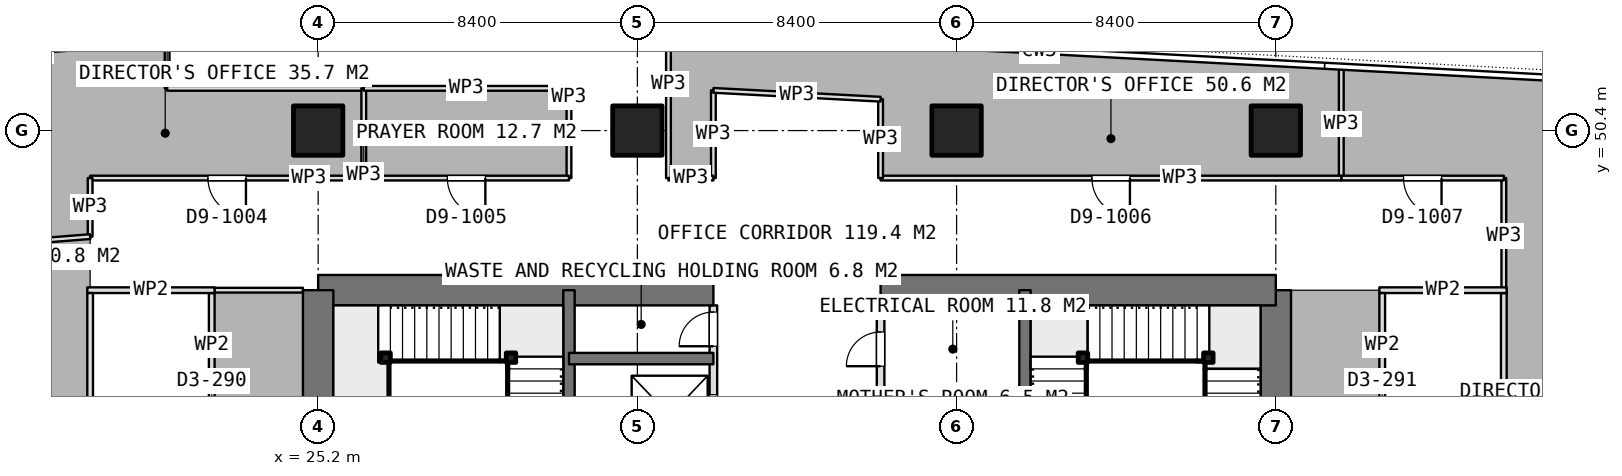
"""IFC4 building model, lengths in metres.
Left out: names, types, materials, properties, quantities, classifications, styles, units other than length and angle.
Written with IfcOpenShell. Run it as: python <this file> out.ifc"""

import sys

from ifc_helpers import new_model, si_unit, direction, frame, frame_2d, origin, origin_2d, place, context, subcontext, project, spatial, rectangle, extrude, element, fill, save


model = new_model("IFC4")
c1 = context("Model", 3, precision=1e-05, world=origin(), true_north=direction((0.0, 1.0)))
c2 = subcontext(c1, "Body", "Model", "MODEL_VIEW")
j1 = project(units=[si_unit("LENGTHUNIT", "METRE"), si_unit("PLANEANGLEUNIT", "RADIAN")], contexts=[c1])
p1 = place(None, origin())
s1 = spatial("IfcSite", under=j1, at=p1, CompositionType="ELEMENT")
p2 = place(p1, origin())
s2 = spatial("IfcBuilding", under=s1, at=p2, CompositionType="ELEMENT")
p3 = place(p2, frame((0.0, 0.0, 268.85)))
s3 = spatial("IfcBuildingStorey", under=s2, at=p3, CompositionType="ELEMENT", Elevation=268.85)
p4 = place(p3, frame((25.2, 46.2, 0.0), z_axis=(0.0, 0.0, 1.0), x_axis=(1.0, 0.0, 0.0)))
e1 = element("IfcWall", 1, at=p4, inside=s3, PredefinedType="SHEAR", context=c2, shape_type="SweptSolid", body=[
    extrude(rectangle(XDim=10.4, YDim=0.8, at=frame_2d((5.2, 0.0))), origin(), (0.0, 0.0, 1.0), 3.75),
])
p5 = place(p3, frame((40.0, 46.2, 0.0), z_axis=(0.0, 0.0, 1.0), x_axis=(1.0, 0.0, 0.0)))
e2 = element("IfcWall", 2, at=p5, inside=s3, PredefinedType="SHEAR", context=c2, shape_type="SweptSolid", body=[
    extrude(rectangle(XDim=10.4, YDim=0.8, at=frame_2d((5.2, 0.0))), origin(), (0.0, 0.0, 1.0), 3.75),
])
p6 = place(p3, frame((25.2, 21.0, 0.0), z_axis=(0.0, 0.0, 1.0), x_axis=(0.0, 1.0, 0.0)))
e3 = element("IfcWall", 3, at=p6, inside=s3, PredefinedType="SHEAR", context=c2, shape_type="SweptSolid", body=[
    extrude(rectangle(XDim=25.2, YDim=0.8, at=frame_2d((12.6, 0.0))), origin(), (0.0, 0.0, 1.0), 3.75),
])
p7 = place(p6, frame((7.8, 0.0, 0.0)))
e4 = element("IfcOpeningElement", 4, at=p7, cuts=e3, PredefinedType="OPENING", context=c2, shape_type="SweptSolid", body=[
    extrude(rectangle(XDim=1.2, YDim=2.1, at=frame_2d((0.6, 1.05))), frame((0.0, 0.41, 0.0), z_axis=(0.0, -1.0, 0.0), x_axis=(1.0, 0.0, 0.0)), (0.0, 0.0, 1.0), 0.82),
])
p8 = place(p6, frame((14.25, 0.0, 0.0)))
e5 = element("IfcOpeningElement", 5, at=p8, cuts=e3, PredefinedType="OPENING", context=c2, shape_type="SweptSolid", body=[
    extrude(rectangle(XDim=0.9, YDim=2.1, at=frame_2d((0.45, 1.05))), frame((0.0, 0.41, 0.0), z_axis=(0.0, -1.0, 0.0), x_axis=(1.0, 0.0, 0.0)), (0.0, 0.0, 1.0), 0.82),
])
p9 = place(p6, frame((16.85, 0.0, 0.0)))
e6 = element("IfcOpeningElement", 6, at=p9, cuts=e3, PredefinedType="OPENING", context=c2, shape_type="SweptSolid", body=[
    extrude(rectangle(XDim=0.9, YDim=2.1, at=frame_2d((0.45, 1.05))), frame((0.0, 0.41, 0.0), z_axis=(0.0, -1.0, 0.0), x_axis=(1.0, 0.0, 0.0)), (0.0, 0.0, 1.0), 0.82),
])
p10 = place(p6, frame((18.95, 0.0, 0.0)))
e7 = element("IfcOpeningElement", 7, at=p10, cuts=e3, PredefinedType="OPENING", context=c2, shape_type="SweptSolid", body=[
    extrude(rectangle(XDim=1.2, YDim=2.1, at=frame_2d((0.6, 1.05))), frame((0.0, 0.41, 0.0), z_axis=(0.0, -1.0, 0.0), x_axis=(1.0, 0.0, 0.0)), (0.0, 0.0, 1.0), 0.82),
])
p11 = place(p3, frame((50.4, 21.0, 0.0), z_axis=(0.0, 0.0, 1.0), x_axis=(0.0, 1.0, 0.0)))
e8 = element("IfcWall", 8, at=p11, inside=s3, PredefinedType="SHEAR", context=c2, shape_type="SweptSolid", body=[
    extrude(rectangle(XDim=25.2, YDim=0.8, at=frame_2d((12.6, 0.0))), origin(), (0.0, 0.0, 1.0), 3.75),
])
p12 = place(p11, frame((16.2, 0.0, 0.0)))
e9 = element("IfcOpeningElement", 9, at=p12, cuts=e8, PredefinedType="OPENING", context=c2, shape_type="SweptSolid", body=[
    extrude(rectangle(XDim=1.2, YDim=2.1, at=frame_2d((0.6, 1.05))), frame((0.0, 0.41, 0.0), z_axis=(0.0, -1.0, 0.0), x_axis=(1.0, 0.0, 0.0)), (0.0, 0.0, 1.0), 0.82),
])
p13 = place(p11, frame((10.05, 0.0, 0.0)))
e10 = element("IfcOpeningElement", 10, at=p13, cuts=e8, PredefinedType="OPENING", context=c2, shape_type="SweptSolid", body=[
    extrude(rectangle(XDim=0.9, YDim=2.1, at=frame_2d((0.45, 1.05))), frame((0.0, 0.41, 0.0), z_axis=(0.0, -1.0, 0.0), x_axis=(1.0, 0.0, 0.0)), (0.0, 0.0, 1.0), 0.82),
])
p14 = place(p11, frame((7.45, 0.0, 0.0)))
e11 = element("IfcOpeningElement", 11, at=p14, cuts=e8, PredefinedType="OPENING", context=c2, shape_type="SweptSolid", body=[
    extrude(rectangle(XDim=0.9, YDim=2.1, at=frame_2d((0.45, 1.05))), frame((0.0, 0.41, 0.0), z_axis=(0.0, -1.0, 0.0), x_axis=(1.0, 0.0, 0.0)), (0.0, 0.0, 1.0), 0.82),
])
p15 = place(p11, frame((0.6, 0.0, 0.0)))
e12 = element("IfcOpeningElement", 12, at=p15, cuts=e8, PredefinedType="OPENING", context=c2, shape_type="SweptSolid", body=[
    extrude(rectangle(XDim=1.2, YDim=2.1, at=frame_2d((0.6, 1.05))), frame((0.0, 0.41, 0.0), z_axis=(0.0, -1.0, 0.0), x_axis=(1.0, 0.0, 0.0)), (0.0, 0.0, 1.0), 0.82),
])
for number, where, z_axis, x_axis in (
    (13, (31.8, 21.0, 0.0), (0.0, 0.0, 1.0), (0.0, 1.0, 0.0)),
    (14, (43.8, 21.0, 0.0), (0.0, 0.0, 1.0), (0.0, 1.0, 0.0)),
):
    element("IfcWall", number, at=place(p3, frame(where, z_axis=z_axis, x_axis=x_axis)), inside=s3, PredefinedType="SHEAR", context=c2, shape_type="SweptSolid", body=[
        extrude(rectangle(XDim=25.2, YDim=0.3, at=frame_2d((12.6, 0.0))), origin(), (0.0, 0.0, 1.0), 3.75),
    ])
p16 = place(p3, frame((31.8, 44.4, 0.0), z_axis=(0.0, 0.0, 1.0), x_axis=(1.0, 0.0, 0.0)))
e15 = element("IfcWall", 15, at=p16, inside=s3, PredefinedType="SHEAR", context=c2, shape_type="SweptSolid", body=[
    extrude(rectangle(XDim=3.8, YDim=0.3, at=frame_2d((1.9, 0.0))), origin(), (0.0, 0.0, 1.0), 3.75),
])
for number, where, z_axis, x_axis in (
    (16, (25.2, 50.4, 0.0), (0.0, 0.0, 1.0), (1.0, 0.0, 0.0)),
    (17, (33.6, 50.4, 0.0), (0.0, 0.0, 1.0), (1.0, 0.0, 0.0)),
    (18, (42.0, 50.4, 0.0), (0.0, 0.0, 1.0), (1.0, 0.0, 0.0)),
    (19, (50.4, 50.4, 0.0), (0.0, 0.0, 1.0), (1.0, 0.0, 0.0)),
):
    element("IfcColumn", number, at=place(p3, frame(where, z_axis=z_axis, x_axis=x_axis)), inside=s3, PredefinedType="COLUMN", context=c2, shape_type="SweptSolid", body=[
        extrude(rectangle(XDim=1.3, YDim=1.3, at=origin_2d()), origin(), (0.0, 0.0, 1.0), 3.75),
    ])
p17 = place(p3, frame((40.0, 41.55, 0.0), z_axis=(0.0, 0.0, 1.0), x_axis=(0.0, 1.0, 0.0)))
e20 = element("IfcWall", 20, at=p17, inside=s3, PredefinedType="PARTITIONING", context=c2, shape_type="SweptSolid", body=[
    extrude(rectangle(XDim=4.25, YDim=0.2, at=frame_2d((2.125, 0.0))), origin(), (0.0, 0.0, 1.0), 3.5),
])
p18 = place(p17, frame((2.65, 0.0, 0.0)))
e21 = element("IfcOpeningElement", 21, at=p18, cuts=e20, PredefinedType="OPENING", context=c2, shape_type="SweptSolid", body=[
    extrude(rectangle(XDim=0.9, YDim=2.1, at=frame_2d((0.45, 1.05))), frame((0.0, 0.11, 0.0), z_axis=(0.0, -1.0, 0.0), x_axis=(1.0, 0.0, 0.0)), (0.0, 0.0, 1.0), 0.22),
])
p19 = place(p17, frame((0.25, 0.0, 0.0)))
e22 = element("IfcOpeningElement", 22, at=p19, cuts=e20, PredefinedType="OPENING", context=c2, shape_type="SweptSolid", body=[
    extrude(rectangle(XDim=0.9, YDim=2.1, at=frame_2d((0.45, 1.05))), frame((0.0, 0.11, 0.0), z_axis=(0.0, -1.0, 0.0), x_axis=(1.0, 0.0, 0.0)), (0.0, 0.0, 1.0), 0.22),
])
p20 = place(p3, frame((35.6, 41.55, 0.0), z_axis=(0.0, 0.0, 1.0), x_axis=(0.0, 1.0, 0.0)))
e23 = element("IfcWall", 23, at=p20, inside=s3, PredefinedType="PARTITIONING", context=c2, shape_type="SweptSolid", body=[
    extrude(rectangle(XDim=4.25, YDim=0.2, at=frame_2d((2.125, 0.0))), origin(), (0.0, 0.0, 1.0), 3.5),
])
p21 = place(p20, frame((3.175, 0.0, 0.0)))
e24 = element("IfcOpeningElement", 24, at=p21, cuts=e23, PredefinedType="OPENING", context=c2, shape_type="SweptSolid", body=[
    extrude(rectangle(XDim=0.9, YDim=2.1, at=frame_2d((0.45, 1.05))), frame((0.0, 0.11, 0.0), z_axis=(0.0, -1.0, 0.0), x_axis=(1.0, 0.0, 0.0)), (0.0, 0.0, 1.0), 0.22),
])
p22 = place(p20, frame((0.8, 0.0, 0.0)))
e25 = element("IfcOpeningElement", 25, at=p22, cuts=e23, PredefinedType="OPENING", context=c2, shape_type="SweptSolid", body=[
    extrude(rectangle(XDim=1.1, YDim=2.1, at=frame_2d((0.55, 1.05))), frame((0.0, 0.11, 0.0), z_axis=(0.0, -1.0, 0.0), x_axis=(1.0, 0.0, 0.0)), (0.0, 0.0, 1.0), 0.22),
])
p23 = place(p3, frame((53.125, 46.2, 0.0), z_axis=(0.0, 0.0, 1.0), x_axis=(1.0, 0.0, 0.0)))
e26 = element("IfcWall", 26, at=p23, inside=s3, PredefinedType="PARTITIONING", context=c2, shape_type="SweptSolid", body=[
    extrude(rectangle(XDim=3.35, YDim=0.15, at=frame_2d((1.675, 0.0))), origin(), (0.0, 0.0, 1.0), 3.5),
])
p24 = place(p3, frame((53.2, 39.275, 0.0), z_axis=(0.0, 0.0, 1.0), x_axis=(0.0, 1.0, 0.0)))
e27 = element("IfcWall", 27, at=p24, inside=s3, PredefinedType="PARTITIONING", context=c2, shape_type="SweptSolid", body=[
    extrude(rectangle(XDim=6.85, YDim=0.15, at=frame_2d((3.425, 0.0))), origin(), (0.0, 0.0, 1.0), 3.5),
])
p25 = place(p24, frame((2.925, 0.0, 0.0)))
e28 = element("IfcOpeningElement", 28, at=p25, cuts=e27, PredefinedType="OPENING", context=c2, shape_type="SweptSolid", body=[
    extrude(rectangle(XDim=1.0, YDim=2.1, at=frame_2d((0.5, 1.05))), frame((0.0, 0.085, 0.0), z_axis=(0.0, -1.0, 0.0), x_axis=(1.0, 0.0, 0.0)), (0.0, 0.0, 1.0), 0.17),
])
p26 = place(p3, frame((56.4, 39.275, 0.0), z_axis=(0.0, 0.0, 1.0), x_axis=(0.0, 1.0, 0.0)))
e29 = element("IfcWall", 29, at=p26, inside=s3, PredefinedType="PARTITIONING", context=c2, shape_type="SweptSolid", body=[
    extrude(rectangle(XDim=6.85, YDim=0.15, at=frame_2d((3.425, 0.0))), origin(), (0.0, 0.0, 1.0), 3.5),
])
p27 = place(p3, frame((19.125, 46.2, 0.0), z_axis=(0.0, 0.0, 1.0), x_axis=(1.0, 0.0, 0.0)))
e30 = element("IfcWall", 30, at=p27, inside=s3, PredefinedType="PARTITIONING", context=c2, shape_type="SweptSolid", body=[
    extrude(rectangle(XDim=3.35, YDim=0.15, at=frame_2d((1.675, 0.0))), origin(), (0.0, 0.0, 1.0), 3.5),
])
p28 = place(p3, frame((19.2, 39.275, 0.0), z_axis=(0.0, 0.0, 1.0), x_axis=(0.0, 1.0, 0.0)))
e31 = element("IfcWall", 31, at=p28, inside=s3, PredefinedType="PARTITIONING", context=c2, shape_type="SweptSolid", body=[
    extrude(rectangle(XDim=6.85, YDim=0.15, at=frame_2d((3.425, 0.0))), origin(), (0.0, 0.0, 1.0), 3.5),
])
p29 = place(p3, frame((22.4, 39.275, 0.0), z_axis=(0.0, 0.0, 1.0), x_axis=(0.0, 1.0, 0.0)))
e32 = element("IfcWall", 32, at=p29, inside=s3, PredefinedType="PARTITIONING", context=c2, shape_type="SweptSolid", body=[
    extrude(rectangle(XDim=6.85, YDim=0.15, at=frame_2d((3.425, 0.0))), origin(), (0.0, 0.0, 1.0), 3.5),
])
p30 = place(p29, frame((2.925, 0.0, 0.0)))
e33 = element("IfcOpeningElement", 33, at=p30, cuts=e32, PredefinedType="OPENING", context=c2, shape_type="SweptSolid", body=[
    extrude(rectangle(XDim=1.0, YDim=2.1, at=frame_2d((0.5, 1.05))), frame((0.0, 0.085, 0.0), z_axis=(0.0, -1.0, 0.0), x_axis=(1.0, 0.0, 0.0)), (0.0, 0.0, 1.0), 0.17),
])
p31 = place(p3, frame((52.123, 49.15, 0.0), z_axis=(0.0, 0.0, 1.0), x_axis=(0.0, 1.0, 0.0)))
e34 = element("IfcWall", 34, at=p31, inside=s3, PredefinedType="PARTITIONING", context=c2, shape_type="SweptSolid", body=[
    extrude(rectangle(XDim=2.852, YDim=0.125, at=frame_2d((1.426, 0.0))), origin(), (0.0, 0.0, 1.0), 3.5),
])
p32 = place(p3, frame((56.4, 46.125, 0.0), z_axis=(0.0, 0.0, 1.0), x_axis=(0.0, 1.0, 0.0)))
e35 = element("IfcWall", 35, at=p32, inside=s3, PredefinedType="PARTITIONING", context=c2, shape_type="SweptSolid", body=[
    extrude(rectangle(XDim=3.025, YDim=0.125, at=frame_2d((1.512, 0.0))), origin(), (0.0, 0.0, 1.0), 3.5),
])
p33 = place(p3, frame((56.4, 49.15, 0.0), z_axis=(0.0, 0.0, 1.0), x_axis=(-1.0, 0.0, 0.0)))
e36 = element("IfcWall", 36, at=p33, inside=s3, PredefinedType="PARTITIONING", context=c2, shape_type="SweptSolid", body=[
    extrude(rectangle(XDim=4.277, YDim=0.125, at=frame_2d((2.138, 0.0))), origin(), (0.0, 0.0, 1.0), 3.5),
])
p34 = place(p33, frame((1.639, 0.0, 0.0)))
e37 = element("IfcOpeningElement", 37, at=p34, cuts=e36, PredefinedType="OPENING", context=c2, shape_type="SweptSolid", body=[
    extrude(rectangle(XDim=1.0, YDim=2.1, at=frame_2d((0.5, 1.05))), frame((0.0, 0.073, 0.0), z_axis=(0.0, -1.0, 0.0), x_axis=(1.0, 0.0, 0.0)), (0.0, 0.0, 1.0), 0.145),
])
p35 = place(p3, frame((35.6, 51.458, 0.0), z_axis=(0.0, 0.0, 1.0), x_axis=(0.0, -1.0, 0.0)))
e38 = element("IfcWall", 38, at=p35, inside=s3, PredefinedType="PARTITIONING", context=c2, shape_type="SweptSolid", body=[
    extrude(rectangle(XDim=2.308, YDim=0.125, at=frame_2d((1.154, 0.0))), origin(), (0.0, 0.0, 1.0), 3.5),
])
p36 = place(p3, frame((35.6, 49.15, 0.0), z_axis=(0.0, 0.0, 1.0), x_axis=(-1.0, 0.0, 0.0)))
e39 = element("IfcWall", 39, at=p36, inside=s3, PredefinedType="PARTITIONING", context=c2, shape_type="SweptSolid", body=[
    extrude(rectangle(XDim=1.182, YDim=0.125, at=frame_2d((0.591, 0.0))), origin(), (0.0, 0.0, 1.0), 3.5),
])
p37 = place(p3, frame((34.418, 49.15, 0.0), z_axis=(0.0, 0.0, 1.0), x_axis=(0.0, 1.0, 0.0)))
e40 = element("IfcWall", 40, at=p37, inside=s3, PredefinedType="PARTITIONING", context=c2, shape_type="SweptSolid", body=[
    extrude(rectangle(XDim=3.793, YDim=0.125, at=frame_2d((1.896, 0.0))), origin(), (0.0, 0.0, 1.0), 3.5),
])
p38 = place(p3, frame((52.123, 49.15, 0.0), z_axis=(0.0, 0.0, 1.0), x_axis=(-1.0, 0.0, 0.0)))
e41 = element("IfcWall", 41, at=p38, inside=s3, PredefinedType="PARTITIONING", context=c2, shape_type="SweptSolid", body=[
    extrude(rectangle(XDim=12.123, YDim=0.125, at=frame_2d((6.062, 0.0))), origin(), (0.0, 0.0, 1.0), 3.5),
])
p39 = place(p38, frame((5.562, 0.0, 0.0)))
e42 = element("IfcOpeningElement", 42, at=p39, cuts=e41, PredefinedType="OPENING", context=c2, shape_type="SweptSolid", body=[
    extrude(rectangle(XDim=1.0, YDim=2.1, at=frame_2d((0.5, 1.05))), frame((0.0, 0.073, 0.0), z_axis=(0.0, -1.0, 0.0), x_axis=(1.0, 0.0, 0.0)), (0.0, 0.0, 1.0), 0.145),
])
p40 = place(p3, frame((40.0, 49.15, 0.0), z_axis=(0.0, 0.0, 1.0), x_axis=(0.0, 1.0, 0.0)))
e43 = element("IfcWall", 43, at=p40, inside=s3, PredefinedType="PARTITIONING", context=c2, shape_type="SweptSolid", body=[
    extrude(rectangle(XDim=2.075, YDim=0.125, at=frame_2d((1.038, 0.0))), origin(), (0.0, 0.0, 1.0), 3.5),
])
p41 = place(p3, frame((40.0, 51.225, 0.0), z_axis=(0.0, 0.0, 1.0), x_axis=(-0.998601864588, 0.052861290579, 0.0)))
e44 = element("IfcWall", 44, at=p41, inside=s3, PredefinedType="PARTITIONING", context=c2, shape_type="SweptSolid", body=[
    extrude(rectangle(XDim=4.406, YDim=0.125, at=frame_2d((2.203, 0.0))), origin(), (0.0, 0.0, 1.0), 3.5),
])
p42 = place(p3, frame((21.226, 52.708, 0.0), z_axis=(0.0, 0.0, 1.0), x_axis=(0.0, -1.0, 0.0)))
e45 = element("IfcWall", 45, at=p42, inside=s3, PredefinedType="PARTITIONING", context=c2, shape_type="SweptSolid", body=[
    extrude(rectangle(XDim=1.197, YDim=0.125, at=frame_2d((0.599, 0.0))), origin(), (0.0, 0.0, 1.0), 3.5),
])
p43 = place(p3, frame((21.226, 51.511, 0.0), z_axis=(0.0, 0.0, 1.0), x_axis=(1.0, 0.0, 0.0)))
e46 = element("IfcWall", 46, at=p43, inside=s3, PredefinedType="PARTITIONING", context=c2, shape_type="SweptSolid", body=[
    extrude(rectangle(XDim=5.174, YDim=0.125, at=frame_2d((2.587, 0.0))), origin(), (0.0, 0.0, 1.0), 3.5),
])
p44 = place(p3, frame((26.4, 51.511, 0.0), z_axis=(0.0, 0.0, 1.0), x_axis=(0.0, -1.0, 0.0)))
e47 = element("IfcWall", 47, at=p44, inside=s3, PredefinedType="PARTITIONING", context=c2, shape_type="SweptSolid", body=[
    extrude(rectangle(XDim=2.361, YDim=0.125, at=frame_2d((1.181, 0.0))), origin(), (0.0, 0.0, 1.0), 3.5),
])
p45 = place(p3, frame((26.4, 49.15, 0.0), z_axis=(0.0, 0.0, 1.0), x_axis=(-1.0, 0.0, 0.0)))
e48 = element("IfcWall", 48, at=p45, inside=s3, PredefinedType="PARTITIONING", context=c2, shape_type="SweptSolid", body=[
    extrude(rectangle(XDim=7.2, YDim=0.125, at=frame_2d((3.6, 0.0))), origin(), (0.0, 0.0, 1.0), 3.5),
])
p46 = place(p45, frame((3.1, 0.0, 0.0)))
e49 = element("IfcOpeningElement", 49, at=p46, cuts=e48, PredefinedType="OPENING", context=c2, shape_type="SweptSolid", body=[
    extrude(rectangle(XDim=1.0, YDim=2.1, at=frame_2d((0.5, 1.05))), frame((0.0, 0.073, 0.0), z_axis=(0.0, -1.0, 0.0), x_axis=(1.0, 0.0, 0.0)), (0.0, 0.0, 1.0), 0.145),
])
p47 = place(p3, frame((19.2, 49.15, 0.0), z_axis=(0.0, 0.0, 1.0), x_axis=(0.0, -1.0, 0.0)))
e50 = element("IfcWall", 50, at=p47, inside=s3, PredefinedType="PARTITIONING", context=c2, shape_type="SweptSolid", body=[
    extrude(rectangle(XDim=1.54, YDim=0.125, at=frame_2d((0.77, 0.0))), origin(), (0.0, 0.0, 1.0), 3.5),
])
p48 = place(p3, frame((19.2, 47.61, 0.0), z_axis=(0.0, 0.0, 1.0), x_axis=(-0.99683691537, -0.079474298708, 0.0)))
e51 = element("IfcWall", 51, at=p48, inside=s3, PredefinedType="PARTITIONING", context=c2, shape_type="SweptSolid", body=[
    extrude(rectangle(XDim=3.259, YDim=0.125, at=frame_2d((1.63, 0.0))), origin(), (0.0, 0.0, 1.0), 3.5),
])
p49 = place(p3, frame((22.476, 46.2, 0.0), z_axis=(0.0, 0.0, 1.0), x_axis=(1.0, 0.0, 0.0)))
e52 = element("IfcWall", 52, at=p49, inside=s3, PredefinedType="PARTITIONING", context=c2, shape_type="SweptSolid", body=[
    extrude(rectangle(XDim=2.324, YDim=0.125, at=frame_2d((1.162, 0.0))), origin(), (0.0, 0.0, 1.0), 3.5),
])
p50 = place(p3, frame((26.4, 51.511, 0.0), z_axis=(0.0, 0.0, 1.0), x_axis=(1.0, 0.0, 0.0)))
e53 = element("IfcWall", 53, at=p50, inside=s3, PredefinedType="PARTITIONING", context=c2, shape_type="SweptSolid", body=[
    extrude(rectangle(XDim=5.4, YDim=0.125, at=frame_2d((2.7, 0.0))), origin(), (0.0, 0.0, 1.0), 3.5),
])
p51 = place(p3, frame((31.8, 51.511, 0.0), z_axis=(0.0, 0.0, 1.0), x_axis=(0.0, -1.0, 0.0)))
e54 = element("IfcWall", 54, at=p51, inside=s3, PredefinedType="PARTITIONING", context=c2, shape_type="SweptSolid", body=[
    extrude(rectangle(XDim=2.361, YDim=0.125, at=frame_2d((1.181, 0.0))), origin(), (0.0, 0.0, 1.0), 3.5),
])
p52 = place(p3, frame((31.8, 49.15, 0.0), z_axis=(0.0, 0.0, 1.0), x_axis=(-1.0, 0.0, 0.0)))
e55 = element("IfcWall", 55, at=p52, inside=s3, PredefinedType="PARTITIONING", context=c2, shape_type="SweptSolid", body=[
    extrude(rectangle(XDim=5.4, YDim=0.125, at=frame_2d((2.7, 0.0))), origin(), (0.0, 0.0, 1.0), 3.5),
])
p53 = place(p52, frame((2.2, 0.0, 0.0)))
e56 = element("IfcOpeningElement", 56, at=p53, cuts=e55, PredefinedType="OPENING", context=c2, shape_type="SweptSolid", body=[
    extrude(rectangle(XDim=1.0, YDim=2.1, at=frame_2d((0.5, 1.05))), frame((0.0, 0.073, 0.0), z_axis=(0.0, -1.0, 0.0), x_axis=(1.0, 0.0, 0.0)), (0.0, 0.0, 1.0), 0.145),
])
for number, where, z_axis, x_axis in (
    (57, (45.325, 44.425, 0.0), (0.0, 0.0, 1.0), (1.0, 0.0, 0.0)),
    (58, (48.625, 44.425, 0.0), (0.0, 0.0, 1.0), (1.0, 0.0, 0.0)),
    (59, (30.275, 44.425, 0.0), (0.0, 0.0, 1.0), (1.0, 0.0, 0.0)),
    (60, (26.975, 44.425, 0.0), (0.0, 0.0, 1.0), (1.0, 0.0, 0.0)),
):
    element("IfcColumn", number, at=place(p3, frame(where, z_axis=z_axis, x_axis=x_axis)), inside=s3, PredefinedType="COLUMN", context=c2, shape_type="SweptSolid", body=[
        extrude(rectangle(XDim=0.25, YDim=0.25, at=origin_2d()), origin(), (0.0, 0.0, 1.0), 3.75),
    ])
p54 = place(p18, origin())
e61 = element("IfcDoor", 61, at=p54, inside=s3, OperationType="SINGLE_SWING_LEFT", PredefinedType="DOOR", context=c2, shape_type="SweptSolid", body=[
    extrude(rectangle(XDim=0.9, YDim=2.1, at=frame_2d((0.45, 1.05))), frame((0.0, 0.025, 0.0), z_axis=(0.0, -1.0, 0.0), x_axis=(1.0, 0.0, 0.0)), (0.0, 0.0, 1.0), 0.05),
])
fill(e21, e61)
p55 = place(p21, origin())
e62 = element("IfcDoor", 62, at=p55, inside=s3, OperationType="SINGLE_SWING_LEFT", PredefinedType="DOOR", context=c2, shape_type="SweptSolid", body=[
    extrude(rectangle(XDim=0.9, YDim=2.1, at=frame_2d((0.45, 1.05))), frame((0.0, 0.025, 0.0), z_axis=(0.0, -1.0, 0.0), x_axis=(1.0, 0.0, 0.0)), (0.0, 0.0, 1.0), 0.05),
])
fill(e24, e62)
p56 = place(p22, origin())
e63 = element("IfcDoor", 63, at=p56, inside=s3, OperationType="SLIDING_TO_LEFT", PredefinedType="USERDEFINED", context=c2, shape_type="SweptSolid", body=[
    extrude(rectangle(XDim=1.1, YDim=2.1, at=frame_2d((0.55, 1.05))), frame((0.0, 0.025, 0.0), z_axis=(0.0, -1.0, 0.0), x_axis=(1.0, 0.0, 0.0)), (0.0, 0.0, 1.0), 0.05),
])
fill(e25, e63)
p57 = place(p34, origin())
e64 = element("IfcDoor", 64, at=p57, inside=s3, OperationType="SINGLE_SWING_LEFT", PredefinedType="DOOR", context=c2, shape_type="SweptSolid", body=[
    extrude(rectangle(XDim=1.0, YDim=2.1, at=frame_2d((0.5, 1.05))), frame((0.0, 0.025, 0.0), z_axis=(0.0, -1.0, 0.0), x_axis=(1.0, 0.0, 0.0)), (0.0, 0.0, 1.0), 0.05),
])
fill(e37, e64)
p58 = place(p39, origin())
e65 = element("IfcDoor", 65, at=p58, inside=s3, OperationType="SINGLE_SWING_LEFT", PredefinedType="DOOR", context=c2, shape_type="SweptSolid", body=[
    extrude(rectangle(XDim=1.0, YDim=2.1, at=frame_2d((0.5, 1.05))), frame((0.0, 0.025, 0.0), z_axis=(0.0, -1.0, 0.0), x_axis=(1.0, 0.0, 0.0)), (0.0, 0.0, 1.0), 0.05),
])
fill(e42, e65)
p59 = place(p46, origin())
e66 = element("IfcDoor", 66, at=p59, inside=s3, OperationType="SINGLE_SWING_LEFT", PredefinedType="DOOR", context=c2, shape_type="SweptSolid", body=[
    extrude(rectangle(XDim=1.0, YDim=2.1, at=frame_2d((0.5, 1.05))), frame((0.0, 0.025, 0.0), z_axis=(0.0, -1.0, 0.0), x_axis=(1.0, 0.0, 0.0)), (0.0, 0.0, 1.0), 0.05),
])
fill(e49, e66)
p60 = place(p53, origin())
e67 = element("IfcDoor", 67, at=p60, inside=s3, OperationType="SINGLE_SWING_LEFT", PredefinedType="DOOR", context=c2, shape_type="SweptSolid", body=[
    extrude(rectangle(XDim=1.0, YDim=2.1, at=frame_2d((0.5, 1.05))), frame((0.0, 0.025, 0.0), z_axis=(0.0, -1.0, 0.0), x_axis=(1.0, 0.0, 0.0)), (0.0, 0.0, 1.0), 0.05),
])
fill(e56, e67)
save(model, sys.argv[1])
